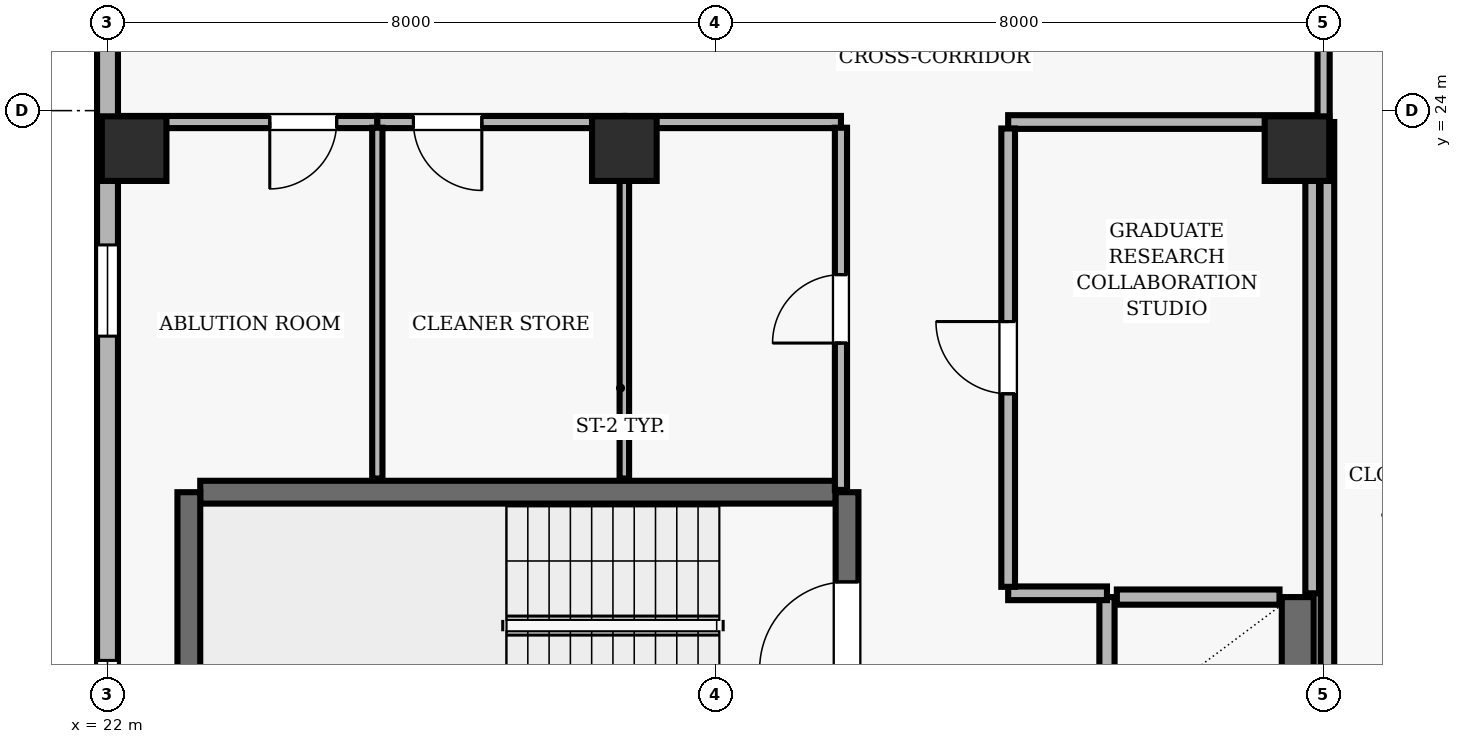
"""IFC4 building model, lengths in metres.
Left out: names, types, materials, properties, quantities, classifications, styles, units other than length and angle.
Written with IfcOpenShell. Run it as: python <this file> out.ifc"""

import sys

from ifc_helpers import new_model, si_unit, direction, frame, frame_2d, origin, origin_2d, place, context, subcontext, project, spatial, rectangle, extrude, element, fill, save


model = new_model("IFC4")
c1 = context("Model", 3, precision=1e-05, world=origin(), true_north=direction((0.0, 1.0)))
c2 = subcontext(c1, "Body", "Model", "MODEL_VIEW")
j1 = project(units=[si_unit("LENGTHUNIT", "METRE"), si_unit("PLANEANGLEUNIT", "RADIAN")], contexts=[c1])
p1 = place(None, origin())
s1 = spatial("IfcSite", under=j1, at=p1, CompositionType="ELEMENT")
p2 = place(p1, origin())
s2 = spatial("IfcBuilding", under=s1, at=p2, CompositionType="ELEMENT")
p3 = place(p2, frame((0.0, 0.0, 248.2)))
s3 = spatial("IfcBuildingStorey", under=s2, at=p3, CompositionType="ELEMENT", Elevation=248.2)
for number, where, z_axis, x_axis in (
    (1, (22.35, 23.5, 0.0), (0.0, 0.0, 1.0), (1.0, 0.0, 0.0)),
    (2, (28.8, 23.5, 0.0), (0.0, 0.0, 1.0), (1.0, 0.0, 0.0)),
    (3, (37.65, 23.5, 0.0), (0.0, 0.0, 1.0), (1.0, 0.0, 0.0)),
):
    element("IfcColumn", number, at=place(p3, frame(where, z_axis=z_axis, x_axis=x_axis)), inside=s3, PredefinedType="COLUMN", context=c2, shape_type="SweptSolid", body=[
        extrude(rectangle(XDim=0.85, YDim=0.85, at=origin_2d()), origin(), (0.0, 0.0, 1.0), 3.9),
    ])
p4 = place(p3, frame((22.0, 35.3, 0.0), z_axis=(0.0, 0.0, 1.0), x_axis=(0.0, -1.0, 0.0)))
e4 = element("IfcWall", 4, at=p4, inside=s3, PredefinedType="SOLIDWALL", context=c2, shape_type="SweptSolid", body=[
    extrude(rectangle(XDim=32.8, YDim=0.275, at=frame_2d((16.4, 0.0))), origin(), (0.0, 0.0, 1.0), 3.69),
])
p5 = place(p4, frame((7.3, 0.0, 0.0)))
e5 = element("IfcOpeningElement", 5, at=p5, cuts=e4, PredefinedType="OPENING", context=c2, shape_type="SweptSolid", body=[
    extrude(rectangle(XDim=1.0, YDim=2.2, at=frame_2d((0.5, 1.1))), frame((0.0, 0.147, 0.0), z_axis=(0.0, -1.0, 0.0), x_axis=(1.0, 0.0, 0.0)), (0.0, 0.0, 1.0), 0.295),
])
p6 = place(p4, frame((2.133, 0.0, 0.9)))
e6 = element("IfcOpeningElement", 6, at=p6, cuts=e4, PredefinedType="OPENING", context=c2, shape_type="SweptSolid", body=[
    extrude(rectangle(XDim=1.2, YDim=1.6, at=frame_2d((0.6, 0.8))), frame((0.0, 0.147, 0.0), z_axis=(0.0, -1.0, 0.0), x_axis=(1.0, 0.0, 0.0)), (0.0, 0.0, 1.0), 0.295),
])
p7 = place(p4, frame((13.067, 0.0, 0.9)))
e7 = element("IfcOpeningElement", 7, at=p7, cuts=e4, PredefinedType="OPENING", context=c2, shape_type="SweptSolid", body=[
    extrude(rectangle(XDim=1.2, YDim=1.6, at=frame_2d((0.6, 0.8))), frame((0.0, 0.147, 0.0), z_axis=(0.0, -1.0, 0.0), x_axis=(1.0, 0.0, 0.0)), (0.0, 0.0, 1.0), 0.295),
])
p8 = place(p4, frame((18.533, 0.0, 0.9)))
e8 = element("IfcOpeningElement", 8, at=p8, cuts=e4, PredefinedType="OPENING", context=c2, shape_type="SweptSolid", body=[
    extrude(rectangle(XDim=1.2, YDim=1.6, at=frame_2d((0.6, 0.8))), frame((0.0, 0.147, 0.0), z_axis=(0.0, -1.0, 0.0), x_axis=(1.0, 0.0, 0.0)), (0.0, 0.0, 1.0), 0.295),
])
p9 = place(p4, frame((24.0, 0.0, 0.9)))
e9 = element("IfcOpeningElement", 9, at=p9, cuts=e4, PredefinedType="OPENING", context=c2, shape_type="SweptSolid", body=[
    extrude(rectangle(XDim=1.2, YDim=1.6, at=frame_2d((0.6, 0.8))), frame((0.0, 0.147, 0.0), z_axis=(0.0, -1.0, 0.0), x_axis=(1.0, 0.0, 0.0)), (0.0, 0.0, 1.0), 0.295),
])
p10 = place(p3, frame((31.58, 18.98, 0.0), z_axis=(0.0, 0.0, 1.0), x_axis=(-1.0, 0.0, 0.0)))
e10 = element("IfcWall", 10, at=p10, inside=s3, PredefinedType="SHEAR", context=c2, shape_type="SweptSolid", body=[
    extrude(rectangle(XDim=8.36, YDim=0.3, at=frame_2d((4.18, 0.0))), origin(), (0.0, 0.0, 1.0), 3.69),
])
p11 = place(p3, frame((23.07, 18.98, 0.0), z_axis=(0.0, 0.0, 1.0), x_axis=(0.0, -1.0, 0.0)))
e11 = element("IfcWall", 11, at=p11, inside=s3, PredefinedType="SHEAR", context=c2, shape_type="SweptSolid", body=[
    extrude(rectangle(XDim=3.51, YDim=0.3, at=frame_2d((1.755, 0.0))), origin(), (0.0, 0.0, 1.0), 3.69),
])
p12 = place(p3, frame((31.73, 15.47, 0.0), z_axis=(0.0, 0.0, 1.0), x_axis=(0.0, 1.0, 0.0)))
e12 = element("IfcWall", 12, at=p12, inside=s3, PredefinedType="SHEAR", context=c2, shape_type="SweptSolid", body=[
    extrude(rectangle(XDim=3.51, YDim=0.3, at=frame_2d((1.755, 0.0))), origin(), (0.0, 0.0, 1.0), 3.69),
])
p13 = place(p12, frame((1.18, 0.0, 0.0)))
e13 = element("IfcOpeningElement", 13, at=p13, cuts=e12, PredefinedType="OPENING", context=c2, shape_type="SweptSolid", body=[
    extrude(rectangle(XDim=1.15, YDim=2.15, at=frame_2d((0.575, 1.075))), frame((0.0, 0.16, 0.0), z_axis=(0.0, -1.0, 0.0), x_axis=(1.0, 0.0, 0.0)), (0.0, 0.0, 1.0), 0.32),
])
p14 = place(p3, frame((35.15, 17.6, 0.0), z_axis=(0.0, 0.0, 1.0), x_axis=(0.0, -1.0, 0.0)))
e14 = element("IfcWall", 14, at=p14, inside=s3, PredefinedType="SOLIDWALL", context=c2, shape_type="SweptSolid", body=[
    extrude(rectangle(XDim=1.85, YDim=0.2, at=frame_2d((0.925, 0.0))), origin(), (0.0, 0.0, 1.0), 3.69),
])
p15 = place(p3, frame((37.66, 15.75, 0.0), z_axis=(0.0, 0.0, 1.0), x_axis=(0.0, 1.0, 0.0)))
e15 = element("IfcWall", 15, at=p15, inside=s3, PredefinedType="SHEAR", context=c2, shape_type="SweptSolid", body=[
    extrude(rectangle(XDim=1.85, YDim=0.42, at=frame_2d((0.925, 0.0))), origin(), (0.0, 0.0, 1.0), 3.69),
])
p16 = place(p3, frame((37.42, 17.6, 0.0), z_axis=(0.0, 0.0, 1.0), x_axis=(-1.0, 0.0, 0.0)))
e16 = element("IfcWall", 16, at=p16, inside=s3, PredefinedType="SOLIDWALL", context=c2, shape_type="SweptSolid", body=[
    extrude(rectangle(XDim=2.14, YDim=0.2, at=frame_2d((1.07, 0.0))), origin(), (0.0, 0.0, 1.0), 3.69),
])
p17 = place(p3, frame((25.55, 23.85, 0.0), z_axis=(0.0, 0.0, 1.0), x_axis=(-1.0, 0.0, 0.0)))
e17 = element("IfcWall", 17, at=p17, inside=s3, PredefinedType="PARTITIONING", context=c2, shape_type="SweptSolid", body=[
    extrude(rectangle(XDim=3.35, YDim=0.16, at=frame_2d((1.675, 0.0))), origin(), (0.0, 0.0, 1.0), 3.221),
])
p18 = place(p17, frame((0.535, 0.0, 0.0)))
e18 = element("IfcOpeningElement", 18, at=p18, cuts=e17, PredefinedType="OPENING", context=c2, shape_type="SweptSolid", body=[
    extrude(rectangle(XDim=0.88, YDim=2.1, at=frame_2d((0.44, 1.05))), frame((0.0, 0.09, 0.0), z_axis=(0.0, -1.0, 0.0), x_axis=(1.0, 0.0, 0.0)), (0.0, 0.0, 1.0), 0.18),
])
p19 = place(p3, frame((28.8, 23.85, 0.0), z_axis=(0.0, 0.0, 1.0), x_axis=(-1.0, 0.0, 0.0)))
e19 = element("IfcWall", 19, at=p19, inside=s3, PredefinedType="PARTITIONING", context=c2, shape_type="SweptSolid", body=[
    extrude(rectangle(XDim=3.25, YDim=0.16, at=frame_2d((1.625, 0.0))), origin(), (0.0, 0.0, 1.0), 3.221),
])
p20 = place(p19, frame((1.875, 0.0, 0.0)))
e20 = element("IfcOpeningElement", 20, at=p20, cuts=e19, PredefinedType="OPENING", context=c2, shape_type="SweptSolid", body=[
    extrude(rectangle(XDim=0.9, YDim=2.1, at=frame_2d((0.45, 1.05))), frame((0.0, 0.09, 0.0), z_axis=(0.0, -1.0, 0.0), x_axis=(1.0, 0.0, 0.0)), (0.0, 0.0, 1.0), 0.18),
])
p21 = place(p3, frame((31.65, 23.85, 0.0), z_axis=(0.0, 0.0, 1.0), x_axis=(-1.0, 0.0, 0.0)))
e21 = element("IfcWall", 21, at=p21, inside=s3, PredefinedType="PARTITIONING", context=c2, shape_type="SweptSolid", body=[
    extrude(rectangle(XDim=2.85, YDim=0.16, at=frame_2d((1.425, 0.0))), origin(), (0.0, 0.0, 1.0), 3.221),
])
p22 = place(p3, frame((33.85, 17.65, 0.0), z_axis=(0.0, 0.0, 1.0), x_axis=(1.0, 0.0, 0.0)))
e22 = element("IfcWall", 22, at=p22, inside=s3, PredefinedType="PARTITIONING", context=c2, shape_type="SweptSolid", body=[
    extrude(rectangle(XDim=1.3, YDim=0.18, at=frame_2d((0.65, 0.0))), origin(), (0.0, 0.0, 1.0), 3.69),
])
p23 = place(p3, frame((37.85, 23.85, 0.0), z_axis=(0.0, 0.0, 1.0), x_axis=(-1.0, 0.0, 0.0)))
e23 = element("IfcWall", 23, at=p23, inside=s3, PredefinedType="PARTITIONING", context=c2, shape_type="SweptSolid", body=[
    extrude(rectangle(XDim=4.0, YDim=0.18, at=frame_2d((2.0, 0.0))), origin(), (0.0, 0.0, 1.0), 3.221),
])
p24 = place(p3, frame((25.55, 19.16, 0.0), z_axis=(0.0, 0.0, 1.0), x_axis=(0.0, 1.0, 0.0)))
e24 = element("IfcWall", 24, at=p24, inside=s3, PredefinedType="PARTITIONING", context=c2, shape_type="SweptSolid", body=[
    extrude(rectangle(XDim=4.615, YDim=0.135, at=frame_2d((2.308, 0.0))), origin(), (0.0, 0.0, 1.0), 3.69),
])
p25 = place(p3, frame((28.8, 23.775, 0.0), z_axis=(0.0, 0.0, 1.0), x_axis=(0.0, -1.0, 0.0)))
e25 = element("IfcWall", 25, at=p25, inside=s3, PredefinedType="PARTITIONING", context=c2, shape_type="SweptSolid", body=[
    extrude(rectangle(XDim=4.615, YDim=0.125, at=frame_2d((2.308, 0.0))), origin(), (0.0, 0.0, 1.0), 3.69),
])
p26 = place(p3, frame((31.65, 19.01, 0.0), z_axis=(0.0, 0.0, 1.0), x_axis=(0.0, 1.0, 0.0)))
e26 = element("IfcWall", 26, at=p26, inside=s3, PredefinedType="PARTITIONING", context=c2, shape_type="SweptSolid", body=[
    extrude(rectangle(XDim=4.765, YDim=0.16, at=frame_2d((2.382, 0.0))), origin(), (0.0, 0.0, 1.0), 3.69),
])
p27 = place(p26, frame((1.932, 0.0, 0.0)))
e27 = element("IfcOpeningElement", 27, at=p27, cuts=e26, PredefinedType="OPENING", context=c2, shape_type="SweptSolid", body=[
    extrude(rectangle(XDim=0.9, YDim=2.1, at=frame_2d((0.45, 1.05))), frame((0.0, 0.09, 0.0), z_axis=(0.0, -1.0, 0.0), x_axis=(1.0, 0.0, 0.0)), (0.0, 0.0, 1.0), 0.18),
])
p28 = place(p3, frame((33.85, 17.735, 0.0), z_axis=(0.0, 0.0, 1.0), x_axis=(0.0, 1.0, 0.0)))
e28 = element("IfcWall", 28, at=p28, inside=s3, PredefinedType="PARTITIONING", context=c2, shape_type="SweptSolid", body=[
    extrude(rectangle(XDim=6.03, YDim=0.18, at=frame_2d((3.015, 0.0))), origin(), (0.0, 0.0, 1.0), 3.69),
])
p29 = place(p28, frame((2.54, 0.0, 0.0)))
e29 = element("IfcOpeningElement", 29, at=p29, cuts=e28, PredefinedType="OPENING", context=c2, shape_type="SweptSolid", body=[
    extrude(rectangle(XDim=0.95, YDim=2.1, at=frame_2d((0.475, 1.05))), frame((0.0, 0.1, 0.0), z_axis=(0.0, -1.0, 0.0), x_axis=(1.0, 0.0, 0.0)), (0.0, 0.0, 1.0), 0.2),
])
p30 = place(p3, frame((37.85, 17.65, 0.0), z_axis=(0.0, 0.0, 1.0), x_axis=(0.0, 1.0, 0.0)))
e30 = element("IfcWall", 30, at=p30, inside=s3, PredefinedType="PARTITIONING", context=c2, shape_type="SweptSolid", body=[
    extrude(rectangle(XDim=6.115, YDim=0.18, at=frame_2d((3.058, 0.0))), origin(), (0.0, 0.0, 1.0), 3.221),
])
p31 = place(p3, frame((38.0, 23.85, 0.0), z_axis=(0.0, 0.0, 1.0), x_axis=(0.0, 1.0, 0.0)))
e31 = element("IfcWall", 31, at=p31, inside=s3, PredefinedType="PARTITIONING", context=c2, shape_type="SweptSolid", body=[
    extrude(rectangle(XDim=1.517, YDim=0.16, at=frame_2d((0.758, 0.0))), origin(), (0.0, 0.0, 1.0), 3.221),
])
p32 = place(p3, frame((38.05, 23.85, 0.0), z_axis=(0.0, 0.0, 1.0), x_axis=(0.0, -1.0, 0.0)))
e32 = element("IfcWall", 32, at=p32, inside=s3, PredefinedType="PARTITIONING", context=c2, shape_type="SweptSolid", body=[
    extrude(rectangle(XDim=7.775, YDim=0.18, at=frame_2d((3.888, 0.0))), origin(), (0.0, 0.0, 1.0), 3.221),
])
p33 = place(p7, origin())
e33 = element("IfcWindow", 33, at=p33, inside=s3, PartitioningType="SINGLE_PANEL", PredefinedType="WINDOW", context=c2, shape_type="SweptSolid", body=[
    extrude(rectangle(XDim=1.2, YDim=1.6, at=frame_2d((0.6, 0.8))), frame((0.0, 0.03, 0.0), z_axis=(0.0, -1.0, 0.0), x_axis=(1.0, 0.0, 0.0)), (0.0, 0.0, 1.0), 0.06),
])
fill(e7, e33)
p34 = place(p8, origin())
e34 = element("IfcWindow", 34, at=p34, inside=s3, PartitioningType="SINGLE_PANEL", PredefinedType="WINDOW", context=c2, shape_type="SweptSolid", body=[
    extrude(rectangle(XDim=1.2, YDim=1.6, at=frame_2d((0.6, 0.8))), frame((0.0, 0.03, 0.0), z_axis=(0.0, -1.0, 0.0), x_axis=(1.0, 0.0, 0.0)), (0.0, 0.0, 1.0), 0.06),
])
fill(e8, e34)
p35 = place(p13, origin())
e35 = element("IfcDoor", 35, at=p35, inside=s3, OperationType="SINGLE_SWING_LEFT", PredefinedType="DOOR", context=c2, shape_type="SweptSolid", body=[
    extrude(rectangle(XDim=1.15, YDim=2.15, at=frame_2d((0.575, 1.075))), frame((0.0, 0.025, 0.0), z_axis=(0.0, -1.0, 0.0), x_axis=(1.0, 0.0, 0.0)), (0.0, 0.0, 1.0), 0.05),
])
fill(e13, e35)
p36 = place(p29, origin())
e36 = element("IfcDoor", 36, at=p36, inside=s3, OperationType="SINGLE_SWING_RIGHT", PredefinedType="DOOR", context=c2, shape_type="SweptSolid", body=[
    extrude(rectangle(XDim=0.95, YDim=2.1, at=frame_2d((0.475, 1.05))), frame((0.0, 0.025, 0.0), z_axis=(0.0, -1.0, 0.0), x_axis=(1.0, 0.0, 0.0)), (0.0, 0.0, 1.0), 0.05),
])
fill(e29, e36)
p37 = place(p27, origin())
e37 = element("IfcDoor", 37, at=p37, inside=s3, OperationType="SINGLE_SWING_LEFT", PredefinedType="DOOR", context=c2, shape_type="SweptSolid", body=[
    extrude(rectangle(XDim=0.9, YDim=2.1, at=frame_2d((0.45, 1.05))), frame((0.0, 0.025, 0.0), z_axis=(0.0, -1.0, 0.0), x_axis=(1.0, 0.0, 0.0)), (0.0, 0.0, 1.0), 0.05),
])
fill(e27, e37)
p38 = place(p18, origin())
e38 = element("IfcDoor", 38, at=p38, inside=s3, OperationType="SINGLE_SWING_RIGHT", PredefinedType="DOOR", context=c2, shape_type="SweptSolid", body=[
    extrude(rectangle(XDim=0.88, YDim=2.1, at=frame_2d((0.44, 1.05))), frame((0.0, 0.025, 0.0), z_axis=(0.0, -1.0, 0.0), x_axis=(1.0, 0.0, 0.0)), (0.0, 0.0, 1.0), 0.05),
])
fill(e18, e38)
p39 = place(p20, origin())
e39 = element("IfcDoor", 39, at=p39, inside=s3, OperationType="SINGLE_SWING_LEFT", PredefinedType="DOOR", context=c2, shape_type="SweptSolid", body=[
    extrude(rectangle(XDim=0.9, YDim=2.1, at=frame_2d((0.45, 1.05))), frame((0.0, 0.025, 0.0), z_axis=(0.0, -1.0, 0.0), x_axis=(1.0, 0.0, 0.0)), (0.0, 0.0, 1.0), 0.05),
])
fill(e20, e39)
save(model, sys.argv[1])
